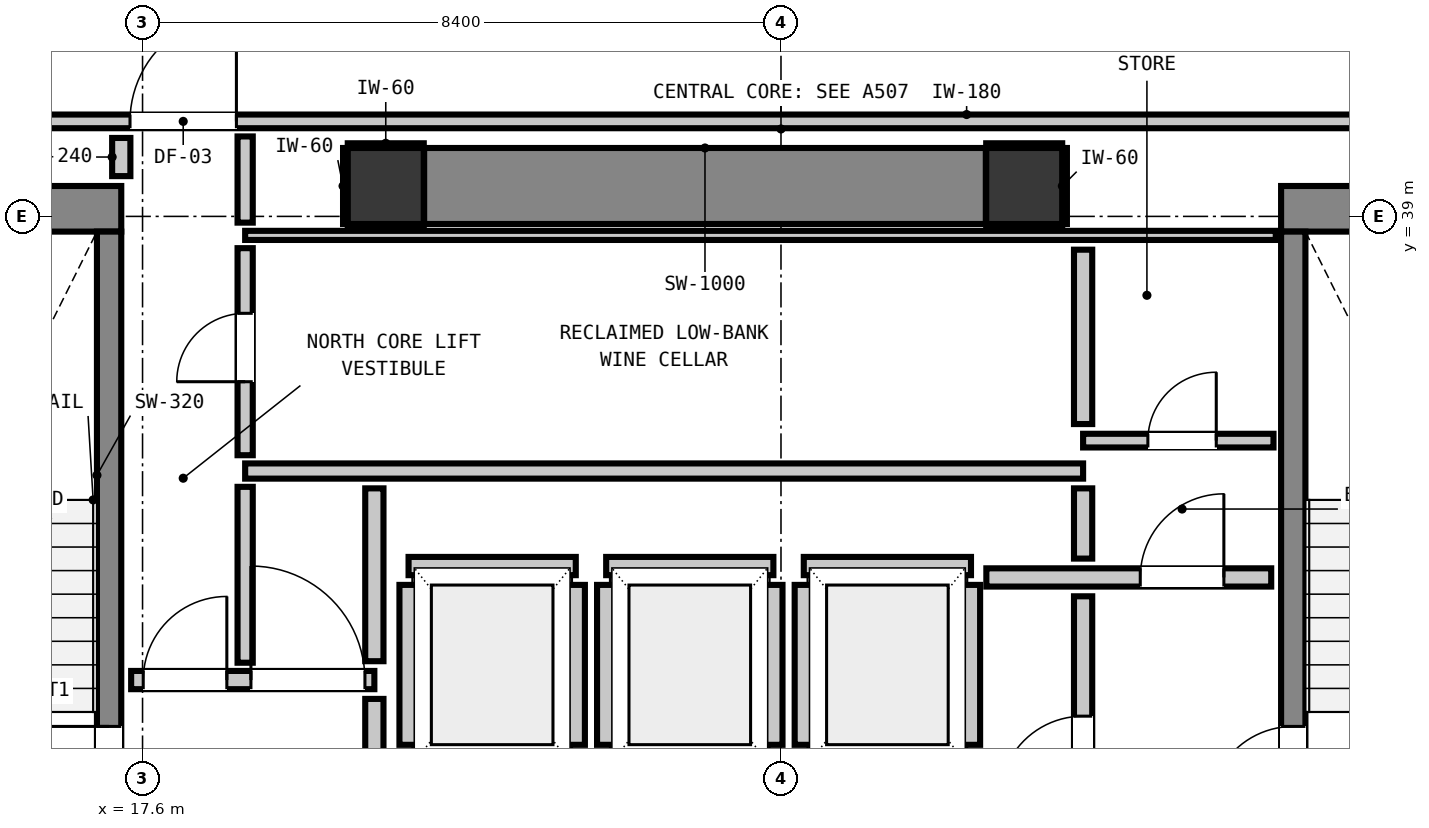
"""IFC4 building model, lengths in metres.
Left out: names, types, materials, properties, quantities, classifications, styles, units other than length and angle.
Written with IfcOpenShell. Run it as: python <this file> out.ifc"""

import sys

from ifc_helpers import new_model, si_unit, direction, frame, frame_2d, origin, origin_2d, place, context, subcontext, project, spatial, rectangle, extrude, element, fill, save


model = new_model("IFC4")
c1 = context("Model", 3, precision=1e-05, world=origin(), true_north=direction((0.0, 1.0)))
c2 = subcontext(c1, "Body", "Model", "MODEL_VIEW")
j1 = project(units=[si_unit("LENGTHUNIT", "METRE"), si_unit("PLANEANGLEUNIT", "RADIAN")], contexts=[c1])
p1 = place(None, origin())
s1 = spatial("IfcSite", under=j1, at=p1, CompositionType="ELEMENT")
p2 = place(p1, origin())
s2 = spatial("IfcBuilding", under=s1, at=p2, CompositionType="ELEMENT")
p3 = place(p2, frame((0.0, 0.0, 149.24)))
s3 = spatial("IfcBuildingStorey", under=s2, at=p3, CompositionType="ELEMENT", Elevation=149.24)
for number, where, z_axis, x_axis in (
    (1, (20.8, 39.4, 0.0), (0.0, 0.0, 1.0), (1.0, 0.0, 0.0)),
    (2, (29.2, 39.4, 0.0), (0.0, 0.0, 1.0), (1.0, 0.0, 0.0)),
):
    element("IfcColumn", number, at=place(p3, frame(where, z_axis=z_axis, x_axis=x_axis)), inside=s3, PredefinedType="COLUMN", context=c2, shape_type="SweptSolid", body=[
        extrude(rectangle(XDim=1.0, YDim=1.0, at=origin_2d()), origin(), (0.0, 0.0, 1.0), 3.32),
    ])
p4 = place(p3, frame((13.24, 39.1, 0.0), z_axis=(0.0, 0.0, 1.0), x_axis=(1.0, 0.0, 0.0)))
e3 = element("IfcWall", 3, at=p4, inside=s3, PredefinedType="SHEAR", context=c2, shape_type="SweptSolid", body=[
    extrude(rectangle(XDim=4.08, YDim=0.6, at=frame_2d((2.04, 0.0))), origin(), (0.0, 0.0, 1.0), 3.32),
])
p5 = place(p3, frame((32.58, 39.1, 0.0), z_axis=(0.0, 0.0, 1.0), x_axis=(1.0, 0.0, 0.0)))
e4 = element("IfcWall", 4, at=p5, inside=s3, PredefinedType="SHEAR", context=c2, shape_type="SweptSolid", body=[
    extrude(rectangle(XDim=4.08, YDim=0.6, at=frame_2d((2.04, 0.0))), origin(), (0.0, 0.0, 1.0), 3.32),
])
p6 = place(p3, frame((21.305, 39.4, 0.0), z_axis=(0.0, 0.0, 1.0), x_axis=(1.0, 0.0, 0.0)))
e5 = element("IfcWall", 5, at=p6, inside=s3, PredefinedType="SHEAR", context=c2, shape_type="SweptSolid", body=[
    extrude(rectangle(XDim=7.39, YDim=1.0, at=frame_2d((3.695, 0.0))), origin(), (0.0, 0.0, 1.0), 3.32),
])
p7 = place(p3, frame((17.16, 31.0, 0.0), z_axis=(0.0, 0.0, 1.0), x_axis=(0.0, 1.0, 0.0)))
e6 = element("IfcWall", 6, at=p7, inside=s3, PredefinedType="SHEAR", context=c2, shape_type="SweptSolid", body=[
    extrude(rectangle(XDim=7.8, YDim=0.32, at=frame_2d((3.9, 0.0))), origin(), (0.0, 0.0, 1.0), 3.32),
])
p8 = place(p7, frame((0.19, 0.0, 0.0)))
e7 = element("IfcOpeningElement", 7, at=p8, cuts=e6, PredefinedType="OPENING", context=c2, shape_type="SweptSolid", body=[
    extrude(rectangle(XDim=1.1, YDim=2.15, at=frame_2d((0.55, 1.075))), frame((0.0, 0.17, 0.0), z_axis=(0.0, -1.0, 0.0), x_axis=(1.0, 0.0, 0.0)), (0.0, 0.0, 1.0), 0.34),
])
p9 = place(p3, frame((32.74, 31.0, 0.0), z_axis=(0.0, 0.0, 1.0), x_axis=(0.0, 1.0, 0.0)))
e8 = element("IfcWall", 8, at=p9, inside=s3, PredefinedType="SHEAR", context=c2, shape_type="SweptSolid", body=[
    extrude(rectangle(XDim=7.8, YDim=0.32, at=frame_2d((3.9, 0.0))), origin(), (0.0, 0.0, 1.0), 3.32),
])
p10 = place(p9, frame((0.19, 0.0, 0.0)))
e9 = element("IfcOpeningElement", 9, at=p10, cuts=e8, PredefinedType="OPENING", context=c2, shape_type="SweptSolid", body=[
    extrude(rectangle(XDim=1.1, YDim=2.15, at=frame_2d((0.55, 1.075))), frame((0.0, 0.17, 0.0), z_axis=(0.0, -1.0, 0.0), x_axis=(1.0, 0.0, 0.0)), (0.0, 0.0, 1.0), 0.34),
])
p11 = place(p3, frame((21.1, 34.4, 0.0), z_axis=(0.0, 0.0, 1.0), x_axis=(1.0, 0.0, 0.0)))
e10 = element("IfcWall", 10, at=p11, inside=s3, PredefinedType="PARTITIONING", context=c2, shape_type="SweptSolid", body=[
    extrude(rectangle(XDim=2.2, YDim=0.24, at=frame_2d((1.1, 0.0))), origin(), (0.0, 0.0, 1.0), 3.08),
])
p12 = place(p3, frame((21.1, 32.048, 0.0), z_axis=(0.0, 0.0, 1.0), x_axis=(0.0, 1.0, 0.0)))
e11 = element("IfcWall", 11, at=p12, inside=s3, PredefinedType="PARTITIONING", context=c2, shape_type="SweptSolid", body=[
    extrude(rectangle(XDim=2.104, YDim=0.24, at=frame_2d((1.052, 0.0))), origin(), (0.0, 0.0, 1.0), 2.315),
])
p13 = place(p3, frame((23.3, 32.048, 0.0), z_axis=(0.0, 0.0, 1.0), x_axis=(0.0, 1.0, 0.0)))
e12 = element("IfcWall", 12, at=p13, inside=s3, PredefinedType="PARTITIONING", context=c2, shape_type="SweptSolid", body=[
    extrude(rectangle(XDim=2.104, YDim=0.24, at=frame_2d((1.052, 0.0))), origin(), (0.0, 0.0, 1.0), 3.08),
])
p14 = place(p3, frame((23.7, 34.4, 0.0), z_axis=(0.0, 0.0, 1.0), x_axis=(1.0, 0.0, 0.0)))
e13 = element("IfcWall", 13, at=p14, inside=s3, PredefinedType="PARTITIONING", context=c2, shape_type="SweptSolid", body=[
    extrude(rectangle(XDim=2.2, YDim=0.24, at=frame_2d((1.1, 0.0))), origin(), (0.0, 0.0, 1.0), 3.08),
])
for number, where, z_axis, x_axis in (
    (14, (23.7, 32.048, 0.0), (0.0, 0.0, 1.0), (0.0, 1.0, 0.0)),
    (15, (25.9, 32.048, 0.0), (0.0, 0.0, 1.0), (0.0, 1.0, 0.0)),
):
    element("IfcWall", number, at=place(p3, frame(where, z_axis=z_axis, x_axis=x_axis)), inside=s3, PredefinedType="PARTITIONING", context=c2, shape_type="SweptSolid", body=[
        extrude(rectangle(XDim=2.104, YDim=0.24, at=frame_2d((1.052, 0.0))), origin(), (0.0, 0.0, 1.0), 3.08),
    ])
p15 = place(p3, frame((26.3, 34.4, 0.0), z_axis=(0.0, 0.0, 1.0), x_axis=(1.0, 0.0, 0.0)))
e16 = element("IfcWall", 16, at=p15, inside=s3, PredefinedType="PARTITIONING", context=c2, shape_type="SweptSolid", body=[
    extrude(rectangle(XDim=2.2, YDim=0.24, at=frame_2d((1.1, 0.0))), origin(), (0.0, 0.0, 1.0), 3.08),
])
for number, where, z_axis, x_axis in (
    (17, (26.3, 32.048, 0.0), (0.0, 0.0, 1.0), (0.0, 1.0, 0.0)),
    (18, (28.5, 32.048, 0.0), (0.0, 0.0, 1.0), (0.0, 1.0, 0.0)),
):
    element("IfcWall", number, at=place(p3, frame(where, z_axis=z_axis, x_axis=x_axis)), inside=s3, PredefinedType="PARTITIONING", context=c2, shape_type="SweptSolid", body=[
        extrude(rectangle(XDim=2.104, YDim=0.24, at=frame_2d((1.052, 0.0))), origin(), (0.0, 0.0, 1.0), 3.08),
    ])
p16 = place(p3, frame((17.45, 32.9, 0.0), z_axis=(0.0, 0.0, 1.0), x_axis=(1.0, 0.0, 0.0)))
e19 = element("IfcWall", 19, at=p16, inside=s3, PredefinedType="PARTITIONING", context=c2, shape_type="SweptSolid", body=[
    extrude(rectangle(XDim=3.2, YDim=0.24, at=frame_2d((1.6, 0.0))), origin(), (0.0, 0.0, 1.0), 3.08),
])
p17 = place(p16, frame((0.159, 0.0, 0.0)))
e20 = element("IfcOpeningElement", 20, at=p17, cuts=e19, PredefinedType="OPENING", context=c2, shape_type="SweptSolid", body=[
    extrude(rectangle(XDim=1.1, YDim=2.15, at=frame_2d((0.55, 1.075))), frame((0.0, 0.13, 0.0), z_axis=(0.0, -1.0, 0.0), x_axis=(1.0, 0.0, 0.0)), (0.0, 0.0, 1.0), 0.26),
])
p18 = place(p16, frame((1.576, 0.0, 0.0)))
e21 = element("IfcOpeningElement", 21, at=p18, cuts=e19, PredefinedType="OPENING", context=c2, shape_type="SweptSolid", body=[
    extrude(rectangle(XDim=1.5, YDim=2.15, at=frame_2d((0.75, 1.075))), frame((0.0, 0.13, 0.0), z_axis=(0.0, -1.0, 0.0), x_axis=(1.0, 0.0, 0.0)), (0.0, 0.0, 1.0), 0.26),
])
p19 = place(p3, frame((28.702, 34.25, 0.0), z_axis=(0.0, 0.0, 1.0), x_axis=(1.0, 0.0, 0.0)))
e22 = element("IfcWall", 22, at=p19, inside=s3, PredefinedType="PARTITIONING", context=c2, shape_type="SweptSolid", body=[
    extrude(rectangle(XDim=3.748, YDim=0.24, at=frame_2d((1.874, 0.0))), origin(), (0.0, 0.0, 1.0), 3.08),
])
p20 = place(p19, frame((2.025, 0.0, 0.0)))
e23 = element("IfcOpeningElement", 23, at=p20, cuts=e22, PredefinedType="OPENING", context=c2, shape_type="SweptSolid", body=[
    extrude(rectangle(XDim=1.1, YDim=2.15, at=frame_2d((0.55, 1.075))), frame((0.0, 0.13, 0.0), z_axis=(0.0, -1.0, 0.0), x_axis=(1.0, 0.0, 0.0)), (0.0, 0.0, 1.0), 0.26),
])
p21 = place(p3, frame((18.95, 35.65, 0.0), z_axis=(0.0, 0.0, 1.0), x_axis=(1.0, 0.0, 0.0)))
e24 = element("IfcWall", 24, at=p21, inside=s3, PredefinedType="PARTITIONING", context=c2, shape_type="SweptSolid", body=[
    extrude(rectangle(XDim=11.025, YDim=0.2, at=frame_2d((5.513, 0.0))), origin(), (0.0, 0.0, 1.0), 3.08),
])
p22 = place(p3, frame((29.975, 36.05, 0.0), z_axis=(0.0, 0.0, 1.0), x_axis=(1.0, 0.0, 0.0)))
e25 = element("IfcWall", 25, at=p22, inside=s3, PredefinedType="PARTITIONING", context=c2, shape_type="SweptSolid", body=[
    extrude(rectangle(XDim=2.505, YDim=0.18, at=frame_2d((1.252, 0.0))), origin(), (0.0, 0.0, 1.0), 3.08),
])
p23 = place(p22, frame((0.852, 0.0, 0.0)))
e26 = element("IfcOpeningElement", 26, at=p23, cuts=e25, PredefinedType="OPENING", context=c2, shape_type="SweptSolid", body=[
    extrude(rectangle(XDim=0.9, YDim=2.1, at=frame_2d((0.45, 1.05))), frame((0.0, 0.1, 0.0), z_axis=(0.0, -1.0, 0.0), x_axis=(1.0, 0.0, 0.0)), (0.0, 0.0, 1.0), 0.2),
])
p24 = place(p3, frame((9.407, 40.25, 0.0), z_axis=(0.0, 0.0, 1.0), x_axis=(1.0, 0.0, 0.0)))
e27 = element("IfcWall", 27, at=p24, inside=s3, PredefinedType="PARTITIONING", context=c2, shape_type="SweptSolid", body=[
    extrude(rectangle(XDim=39.386, YDim=0.18, at=frame_2d((19.693, 0.0))), origin(), (0.0, 0.0, 1.0), 3.08),
])
p25 = place(p24, frame((8.028, 0.0, 0.0)))
e28 = element("IfcOpeningElement", 28, at=p25, cuts=e27, PredefinedType="OPENING", context=c2, shape_type="SweptSolid", body=[
    extrude(rectangle(XDim=1.4, YDim=2.15, at=frame_2d((0.7, 1.075))), frame((0.0, 0.1, 0.0), z_axis=(0.0, -1.0, 0.0), x_axis=(1.0, 0.0, 0.0)), (0.0, 0.0, 1.0), 0.2),
])
p26 = place(p24, frame((1.192, 0.0, 0.0)))
e29 = element("IfcOpeningElement", 29, at=p26, cuts=e27, PredefinedType="OPENING", context=c2, shape_type="SweptSolid", body=[
    extrude(rectangle(XDim=1.4, YDim=2.15, at=frame_2d((0.7, 1.075))), frame((0.0, 0.1, 0.0), z_axis=(0.0, -1.0, 0.0), x_axis=(1.0, 0.0, 0.0)), (0.0, 0.0, 1.0), 0.2),
])
p27 = place(p24, frame((28.643, 0.0, 0.0)))
e30 = element("IfcOpeningElement", 30, at=p27, cuts=e27, PredefinedType="OPENING", context=c2, shape_type="SweptSolid", body=[
    extrude(rectangle(XDim=1.4, YDim=2.15, at=frame_2d((0.7, 1.075))), frame((0.0, 0.1, 0.0), z_axis=(0.0, -1.0, 0.0), x_axis=(1.0, 0.0, 0.0)), (0.0, 0.0, 1.0), 0.2),
])
p28 = place(p3, frame((18.95, 38.75, 0.0), z_axis=(0.0, 0.0, 1.0), x_axis=(1.0, 0.0, 0.0)))
e31 = element("IfcWall", 31, at=p28, inside=s3, PredefinedType="PARTITIONING", context=c2, shape_type="SweptSolid", body=[
    extrude(rectangle(XDim=13.56, YDim=0.12, at=frame_2d((6.78, 0.0))), origin(), (0.0, 0.0, 1.0), 3.08),
])
p29 = place(p3, frame((17.32, 39.53, 0.0), z_axis=(0.0, 0.0, 1.0), x_axis=(0.0, 1.0, 0.0)))
e32 = element("IfcWall", 32, at=p29, inside=s3, PredefinedType="PARTITIONING", context=c2, shape_type="SweptSolid", body=[
    extrude(rectangle(XDim=0.502, YDim=0.24, at=frame_2d((0.251, 0.0))), origin(), (0.0, 0.0, 1.0), 3.08),
])
p30 = place(p3, frame((20.65, 31.868, 0.0), z_axis=(0.0, 0.0, 1.0), x_axis=(0.0, 1.0, 0.0)))
e33 = element("IfcWall", 33, at=p30, inside=s3, PredefinedType="PARTITIONING", context=c2, shape_type="SweptSolid", body=[
    extrude(rectangle(XDim=0.784, YDim=0.24, at=frame_2d((0.392, 0.0))), origin(), (0.0, 0.0, 1.0), 2.315),
])
p31 = place(p3, frame((20.65, 33.148, 0.0), z_axis=(0.0, 0.0, 1.0), x_axis=(0.0, 1.0, 0.0)))
e34 = element("IfcWall", 34, at=p31, inside=s3, PredefinedType="PARTITIONING", context=c2, shape_type="SweptSolid", body=[
    extrude(rectangle(XDim=2.274, YDim=0.24, at=frame_2d((1.137, 0.0))), origin(), (0.0, 0.0, 1.0), 2.315),
])
p32 = place(p3, frame((29.975, 29.768, 0.0), z_axis=(0.0, 0.0, 1.0), x_axis=(0.0, 1.0, 0.0)))
e35 = element("IfcWall", 35, at=p32, inside=s3, PredefinedType="PARTITIONING", context=c2, shape_type="SweptSolid", body=[
    extrude(rectangle(XDim=4.234, YDim=0.24, at=frame_2d((2.117, 0.0))), origin(), (0.0, 0.0, 1.0), 3.08),
])
p33 = place(p32, frame((1.557, 0.0, 0.0)))
e36 = element("IfcOpeningElement", 36, at=p33, cuts=e35, PredefinedType="OPENING", context=c2, shape_type="SweptSolid", body=[
    extrude(rectangle(XDim=1.1, YDim=2.15, at=frame_2d((0.55, 1.075))), frame((0.0, 0.13, 0.0), z_axis=(0.0, -1.0, 0.0), x_axis=(1.0, 0.0, 0.0)), (0.0, 0.0, 1.0), 0.26),
])
p34 = place(p3, frame((29.975, 34.498, 0.0), z_axis=(0.0, 0.0, 1.0), x_axis=(0.0, 1.0, 0.0)))
e37 = element("IfcWall", 37, at=p34, inside=s3, PredefinedType="PARTITIONING", context=c2, shape_type="SweptSolid", body=[
    extrude(rectangle(XDim=0.924, YDim=0.24, at=frame_2d((0.462, 0.0))), origin(), (0.0, 0.0, 1.0), 3.08),
])
p35 = place(p3, frame((29.975, 36.268, 0.0), z_axis=(0.0, 0.0, 1.0), x_axis=(0.0, 1.0, 0.0)))
e38 = element("IfcWall", 38, at=p35, inside=s3, PredefinedType="PARTITIONING", context=c2, shape_type="SweptSolid", body=[
    extrude(rectangle(XDim=2.294, YDim=0.24, at=frame_2d((1.147, 0.0))), origin(), (0.0, 0.0, 1.0), 3.08),
])
p36 = place(p3, frame((18.95, 33.128, 0.0), z_axis=(0.0, 0.0, 1.0), x_axis=(0.0, 1.0, 0.0)))
e39 = element("IfcWall", 39, at=p36, inside=s3, PredefinedType="PARTITIONING", context=c2, shape_type="SweptSolid", body=[
    extrude(rectangle(XDim=2.314, YDim=0.2, at=frame_2d((1.157, 0.0))), origin(), (0.0, 0.0, 1.0), 3.08),
])
p37 = place(p3, frame((18.95, 35.858, 0.0), z_axis=(0.0, 0.0, 1.0), x_axis=(0.0, 1.0, 0.0)))
e40 = element("IfcWall", 40, at=p37, inside=s3, PredefinedType="PARTITIONING", context=c2, shape_type="SweptSolid", body=[
    extrude(rectangle(XDim=2.724, YDim=0.2, at=frame_2d((1.362, 0.0))), origin(), (0.0, 0.0, 1.0), 3.08),
])
p38 = place(p37, frame((0.967, 0.0, 0.0)))
e41 = element("IfcOpeningElement", 41, at=p38, cuts=e40, PredefinedType="OPENING", context=c2, shape_type="SweptSolid", body=[
    extrude(rectangle(XDim=0.9, YDim=2.1, at=frame_2d((0.45, 1.05))), frame((0.0, 0.11, 0.0), z_axis=(0.0, -1.0, 0.0), x_axis=(1.0, 0.0, 0.0)), (0.0, 0.0, 1.0), 0.22),
])
p39 = place(p3, frame((18.95, 38.918, 0.0), z_axis=(0.0, 0.0, 1.0), x_axis=(0.0, 1.0, 0.0)))
e42 = element("IfcWall", 42, at=p39, inside=s3, PredefinedType="PARTITIONING", context=c2, shape_type="SweptSolid", body=[
    extrude(rectangle(XDim=1.134, YDim=0.2, at=frame_2d((0.567, 0.0))), origin(), (0.0, 0.0, 1.0), 3.08),
])
for number, where, z_axis, x_axis in (
    (43, (20.3, 38.868, 0.0), (0.0, 0.0, 1.0), (1.0, 0.0, 0.0)),
    (44, (20.3, 39.932, 0.0), (0.0, 0.0, 1.0), (1.0, 0.0, 0.0)),
    (45, (20.268, 38.9, 0.0), (0.0, 0.0, 1.0), (0.0, 1.0, 0.0)),
    (46, (28.7, 38.868, 0.0), (0.0, 0.0, 1.0), (1.0, 0.0, 0.0)),
    (47, (28.7, 39.932, 0.0), (0.0, 0.0, 1.0), (1.0, 0.0, 0.0)),
    (48, (29.732, 38.9, 0.0), (0.0, 0.0, 1.0), (0.0, 1.0, 0.0)),
):
    element("IfcWall", number, at=place(p3, frame(where, z_axis=z_axis, x_axis=x_axis)), inside=s3, PredefinedType="PARTITIONING", context=c2, shape_type="SweptSolid", body=[
        extrude(rectangle(XDim=1.0, YDim=0.06, at=frame_2d((0.5, 0.0))), origin(), (0.0, 0.0, 1.0), 1.45),
    ])
p40 = place(p8, origin())
e49 = element("IfcDoor", 49, at=p40, inside=s3, OperationType="SINGLE_SWING_RIGHT", PredefinedType="DOOR", context=c2, shape_type="SweptSolid", body=[
    extrude(rectangle(XDim=1.1, YDim=2.15, at=frame_2d((0.55, 1.075))), frame((0.0, 0.025, 0.0), z_axis=(0.0, -1.0, 0.0), x_axis=(1.0, 0.0, 0.0)), (0.0, 0.0, 1.0), 0.05),
])
fill(e7, e49)
p41 = place(p10, origin())
e50 = element("IfcDoor", 50, at=p41, inside=s3, OperationType="SINGLE_SWING_LEFT", PredefinedType="DOOR", context=c2, shape_type="SweptSolid", body=[
    extrude(rectangle(XDim=1.1, YDim=2.15, at=frame_2d((0.55, 1.075))), frame((0.0, 0.025, 0.0), z_axis=(0.0, -1.0, 0.0), x_axis=(1.0, 0.0, 0.0)), (0.0, 0.0, 1.0), 0.05),
])
fill(e9, e50)
p42 = place(p17, origin())
e51 = element("IfcDoor", 51, at=p42, inside=s3, OperationType="SINGLE_SWING_RIGHT", PredefinedType="DOOR", context=c2, shape_type="SweptSolid", body=[
    extrude(rectangle(XDim=1.1, YDim=2.15, at=frame_2d((0.55, 1.075))), frame((0.0, 0.025, 0.0), z_axis=(0.0, -1.0, 0.0), x_axis=(1.0, 0.0, 0.0)), (0.0, 0.0, 1.0), 0.05),
])
fill(e20, e51)
p43 = place(p33, origin())
e52 = element("IfcDoor", 52, at=p43, inside=s3, OperationType="SINGLE_SWING_LEFT", PredefinedType="DOOR", context=c2, shape_type="SweptSolid", body=[
    extrude(rectangle(XDim=1.1, YDim=2.15, at=frame_2d((0.55, 1.075))), frame((0.0, 0.025, 0.0), z_axis=(0.0, -1.0, 0.0), x_axis=(1.0, 0.0, 0.0)), (0.0, 0.0, 1.0), 0.05),
])
fill(e36, e52)
p44 = place(p20, origin())
e53 = element("IfcDoor", 53, at=p44, inside=s3, OperationType="SINGLE_SWING_RIGHT", PredefinedType="DOOR", context=c2, shape_type="SweptSolid", body=[
    extrude(rectangle(XDim=1.1, YDim=2.15, at=frame_2d((0.55, 1.075))), frame((0.0, 0.025, 0.0), z_axis=(0.0, -1.0, 0.0), x_axis=(1.0, 0.0, 0.0)), (0.0, 0.0, 1.0), 0.05),
])
fill(e23, e53)
p45 = place(p25, origin())
e54 = element("IfcDoor", 54, at=p45, inside=s3, OperationType="SINGLE_SWING_RIGHT", PredefinedType="DOOR", context=c2, shape_type="SweptSolid", body=[
    extrude(rectangle(XDim=1.4, YDim=2.15, at=frame_2d((0.7, 1.075))), frame((0.0, 0.025, 0.0), z_axis=(0.0, -1.0, 0.0), x_axis=(1.0, 0.0, 0.0)), (0.0, 0.0, 1.0), 0.05),
])
fill(e28, e54)
p46 = place(p18, origin())
e55 = element("IfcDoor", 55, at=p46, inside=s3, OperationType="SINGLE_SWING_LEFT", PredefinedType="DOOR", context=c2, shape_type="SweptSolid", body=[
    extrude(rectangle(XDim=1.5, YDim=2.15, at=frame_2d((0.75, 1.075))), frame((0.0, 0.025, 0.0), z_axis=(0.0, -1.0, 0.0), x_axis=(1.0, 0.0, 0.0)), (0.0, 0.0, 1.0), 0.05),
])
fill(e21, e55)
p47 = place(p23, origin())
e56 = element("IfcDoor", 56, at=p47, inside=s3, OperationType="SINGLE_SWING_RIGHT", PredefinedType="DOOR", context=c2, shape_type="SweptSolid", body=[
    extrude(rectangle(XDim=0.9, YDim=2.1, at=frame_2d((0.45, 1.05))), frame((0.0, 0.025, 0.0), z_axis=(0.0, -1.0, 0.0), x_axis=(1.0, 0.0, 0.0)), (0.0, 0.0, 1.0), 0.05),
])
fill(e26, e56)
p48 = place(p38, origin())
e57 = element("IfcDoor", 57, at=p48, inside=s3, OperationType="SINGLE_SWING_LEFT", PredefinedType="DOOR", context=c2, shape_type="SweptSolid", body=[
    extrude(rectangle(XDim=0.9, YDim=2.1, at=frame_2d((0.45, 1.05))), frame((0.0, 0.025, 0.0), z_axis=(0.0, -1.0, 0.0), x_axis=(1.0, 0.0, 0.0)), (0.0, 0.0, 1.0), 0.05),
])
fill(e41, e57)
save(model, sys.argv[1])
